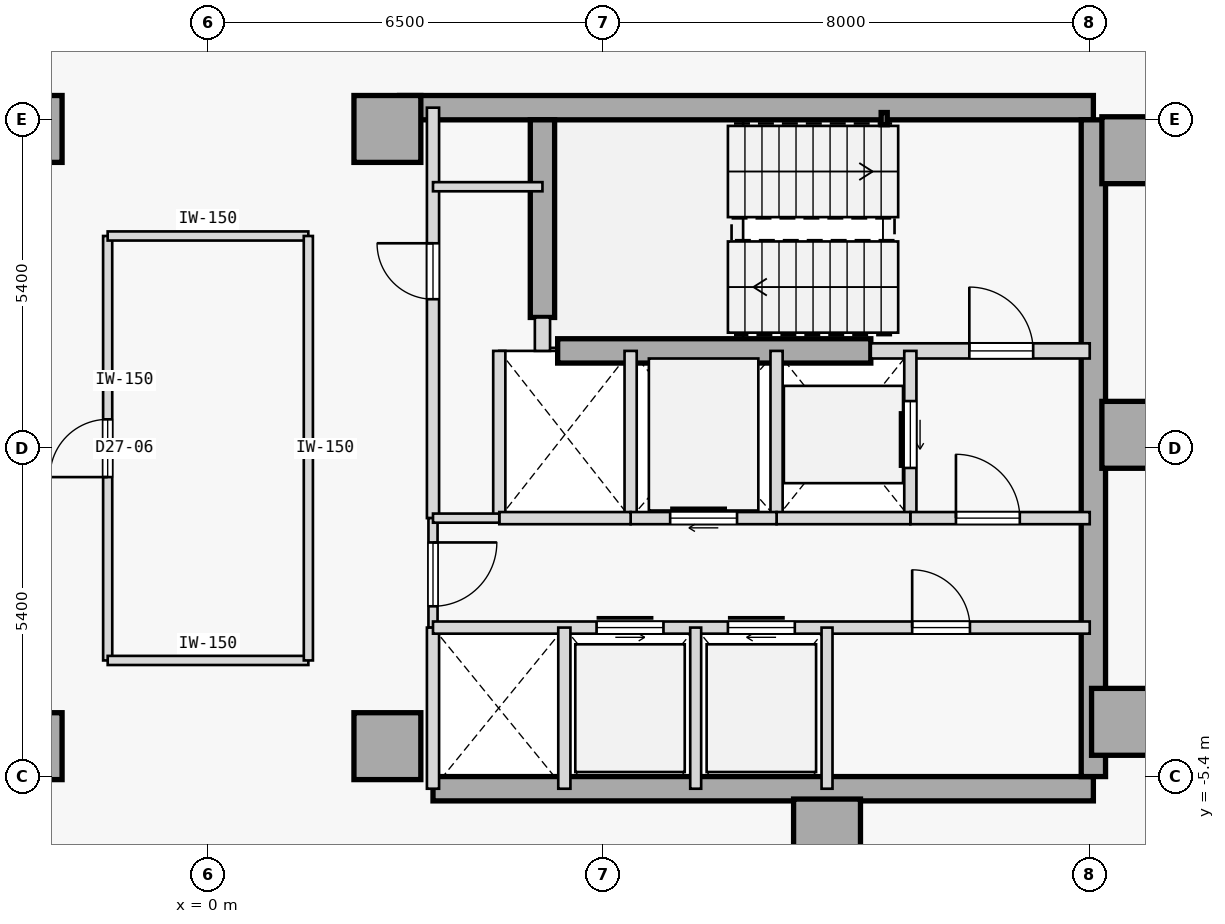
"""IFC4 building model, lengths in metres.
Left out: names, types, materials, properties, quantities, classifications, styles, units other than length and angle.
Written with IfcOpenShell. Run it as: python <this file> out.ifc"""

import sys

from ifc_helpers import new_model, si_unit, direction, frame, frame_2d, origin, origin_2d, place, context, subcontext, project, spatial, rectangle, hollow_rectangle, extrude, element, fill, save


model = new_model("IFC4")
c1 = context("Model", 3, precision=1e-05, world=origin(), true_north=direction((0.0, 1.0)))
c2 = subcontext(c1, "Body", "Model", "MODEL_VIEW")
j1 = project(units=[si_unit("LENGTHUNIT", "METRE"), si_unit("PLANEANGLEUNIT", "RADIAN")], contexts=[c1])
p1 = place(None, origin())
s1 = spatial("IfcSite", under=j1, at=p1, CompositionType="ELEMENT")
p2 = place(p1, origin())
s2 = spatial("IfcBuilding", under=s1, at=p2, CompositionType="ELEMENT")
p3 = place(p2, frame((0.0, 0.0, 109.6)))
s3 = spatial("IfcBuildingStorey", under=s2, at=p3, CompositionType="ELEMENT", Elevation=109.6)
for number, where, z_axis, x_axis in (
    (1, (-2.95, -4.9, 0.0), (0.0, 0.0, 1.0), (1.0, 0.0, 0.0)),
    (2, (-2.95, 5.25, 0.0), (0.0, 0.0, 1.0), (1.0, 0.0, 0.0)),
    (3, (15.25, 4.9, 0.0), (0.0, 0.0, 1.0), (1.0, 0.0, 0.0)),
    (4, (15.25, 0.22, 0.0), (0.0, 0.0, 1.0), (1.0, 0.0, 0.0)),
    (5, (15.08, -4.5, 0.0), (0.0, 0.0, 1.0), (1.0, 0.0, 0.0)),
    (6, (10.18, -6.32, 0.0), (0.0, 0.0, 1.0), (1.0, 0.0, 0.0)),
    (7, (2.95, -4.9, 0.0), (0.0, 0.0, 1.0), (1.0, 0.0, 0.0)),
    (8, (2.95, 5.25, 0.0), (0.0, 0.0, 1.0), (1.0, 0.0, 0.0)),
):
    element("IfcColumn", number, at=place(p3, frame(where, z_axis=z_axis, x_axis=x_axis)), inside=s3, PredefinedType="COLUMN", context=c2, shape_type="SweptSolid", body=[
        extrude(rectangle(XDim=1.1, YDim=1.1, at=origin_2d()), origin(), (0.0, 0.0, 1.0), 3.7),
    ])
p4 = place(p3, frame((3.15, 5.6, 0.0), z_axis=(0.0, 0.0, 1.0), x_axis=(1.0, 0.0, 0.0)))
e9 = element("IfcWall", 9, at=p4, inside=s3, PredefinedType="SHEAR", context=c2, shape_type="SweptSolid", body=[
    extrude(rectangle(XDim=11.41, YDim=0.4, at=frame_2d((5.705, 0.0))), origin(), (0.0, 0.0, 1.0), 3.475),
])
p5 = place(p3, frame((3.7, -5.6, 0.0), z_axis=(0.0, 0.0, 1.0), x_axis=(1.0, 0.0, 0.0)))
e10 = element("IfcWall", 10, at=p5, inside=s3, PredefinedType="SHEAR", context=c2, shape_type="SweptSolid", body=[
    extrude(rectangle(XDim=10.86, YDim=0.4, at=frame_2d((5.43, 0.0))), origin(), (0.0, 0.0, 1.0), 3.475),
])
p6 = place(p3, frame((14.56, -5.4, 0.0), z_axis=(0.0, 0.0, 1.0), x_axis=(0.0, 1.0, 0.0)))
e11 = element("IfcWall", 11, at=p6, inside=s3, PredefinedType="SHEAR", context=c2, shape_type="SweptSolid", body=[
    extrude(rectangle(XDim=10.8, YDim=0.4, at=frame_2d((5.4, 0.0))), origin(), (0.0, 0.0, 1.0), 3.475),
])
p7 = place(p3, frame((5.5, 2.15, 0.0), z_axis=(0.0, 0.0, 1.0), x_axis=(0.0, 1.0, 0.0)))
e12 = element("IfcWall", 12, at=p7, inside=s3, PredefinedType="SHEAR", context=c2, shape_type="SweptSolid", body=[
    extrude(rectangle(XDim=3.25, YDim=0.4, at=frame_2d((1.625, 0.0))), origin(), (0.0, 0.0, 1.0), 3.475),
])
p8 = place(p3, frame((5.75, 1.6, 0.0), z_axis=(0.0, 0.0, 1.0), x_axis=(1.0, 0.0, 0.0)))
e13 = element("IfcWall", 13, at=p8, inside=s3, PredefinedType="SHEAR", context=c2, shape_type="SweptSolid", body=[
    extrude(rectangle(XDim=5.15, YDim=0.4, at=frame_2d((2.575, 0.0))), origin(), (0.0, 0.0, 1.0), 3.475),
])
p9 = place(p3, frame((11.12, 5.42, 0.0), z_axis=(0.0, 0.0, 1.0), x_axis=(1.0, 0.0, 0.0)))
e14 = element("IfcColumn", 14, at=p9, inside=s3, PredefinedType="COLUMN", context=c2, shape_type="SweptSolid", body=[
    extrude(hollow_rectangle(XDim=0.1, YDim=0.2, WallThickness=0.008, at=origin_2d()), origin(), (0.0, 0.0, 1.0), 3.7),
])
p10 = place(p3, frame((10.9, 1.6, 0.0), z_axis=(0.0, 0.0, 1.0), x_axis=(1.0, 0.0, 0.0)))
e15 = element("IfcWall", 15, at=p10, inside=s3, PredefinedType="STANDARD", context=c2, shape_type="SweptSolid", body=[
    extrude(rectangle(XDim=3.6, YDim=0.25, at=frame_2d((1.8, 0.0))), origin(), (0.0, 0.0, 1.0), 3.475),
])
p11 = place(p10, frame((1.62, 0.0, 0.0)))
e16 = element("IfcOpeningElement", 16, at=p11, cuts=e15, PredefinedType="OPENING", context=c2, shape_type="SweptSolid", body=[
    extrude(rectangle(XDim=1.05, YDim=2.15, at=frame_2d((0.525, 1.075))), frame((0.0, 0.135, 0.0), z_axis=(0.0, -1.0, 0.0), x_axis=(1.0, 0.0, 0.0)), (0.0, 0.0, 1.0), 0.27),
])
p12 = place(p3, frame((5.5, 1.6, 0.0), z_axis=(0.0, 0.0, 1.0), x_axis=(0.0, 1.0, 0.0)))
e17 = element("IfcWall", 17, at=p12, inside=s3, PredefinedType="STANDARD", context=c2, shape_type="SweptSolid", body=[
    extrude(rectangle(XDim=0.55, YDim=0.25, at=frame_2d((0.275, 0.0))), origin(), (0.0, 0.0, 1.0), 3.475),
])
p13 = place(p3, frame((3.7, -1.15, 0.0), z_axis=(0.0, 0.0, 1.0), x_axis=(0.0, 1.0, 0.0)))
e18 = element("IfcWall", 18, at=p13, inside=s3, PredefinedType="STANDARD", context=c2, shape_type="SweptSolid", body=[
    extrude(rectangle(XDim=6.75, YDim=0.2, at=frame_2d((3.375, 0.0))), origin(), (0.0, 0.0, 1.0), 3.475),
])
p14 = place(p13, frame((3.6, 0.0, 0.0)))
e19 = element("IfcOpeningElement", 19, at=p14, cuts=e18, PredefinedType="OPENING", context=c2, shape_type="SweptSolid", body=[
    extrude(rectangle(XDim=0.92, YDim=2.15, at=frame_2d((0.46, 1.075))), frame((0.0, 0.11, 0.0), z_axis=(0.0, -1.0, 0.0), x_axis=(1.0, 0.0, 0.0)), (0.0, 0.0, 1.0), 0.22),
])
p15 = place(p3, frame((3.7, -2.95, 0.0), z_axis=(0.0, 0.0, 1.0), x_axis=(0.0, 1.0, 0.0)))
e20 = element("IfcWall", 20, at=p15, inside=s3, PredefinedType="PARTITIONING", context=c2, shape_type="SweptSolid", body=[
    extrude(rectangle(XDim=1.8, YDim=0.15, at=frame_2d((0.9, 0.0))), origin(), (0.0, 0.0, 1.0), 3.475),
])
p16 = place(p15, frame((0.35, 0.0, 0.0)))
e21 = element("IfcOpeningElement", 21, at=p16, cuts=e20, PredefinedType="OPENING", context=c2, shape_type="SweptSolid", body=[
    extrude(rectangle(XDim=1.05, YDim=2.18, at=frame_2d((0.525, 1.09))), frame((0.0, 0.085, 0.0), z_axis=(0.0, -1.0, 0.0), x_axis=(1.0, 0.0, 0.0)), (0.0, 0.0, 1.0), 0.17),
])
p17 = place(p3, frame((3.7, -5.6, 0.0), z_axis=(0.0, 0.0, 1.0), x_axis=(0.0, 1.0, 0.0)))
e22 = element("IfcWall", 22, at=p17, inside=s3, PredefinedType="STANDARD", context=c2, shape_type="SweptSolid", body=[
    extrude(rectangle(XDim=2.65, YDim=0.2, at=frame_2d((1.325, 0.0))), origin(), (0.0, 0.0, 1.0), 3.475),
])
p18 = place(p3, frame((11.55, -1.15, 0.0), z_axis=(0.0, 0.0, 1.0), x_axis=(0.0, 1.0, 0.0)))
e23 = element("IfcWall", 23, at=p18, inside=s3, PredefinedType="STANDARD", context=c2, shape_type="SweptSolid", body=[
    extrude(rectangle(XDim=2.75, YDim=0.2, at=frame_2d((1.375, 0.0))), origin(), (0.0, 0.0, 1.0), 3.475),
])
p19 = place(p18, frame((0.825, 0.0, 0.0)))
e24 = element("IfcOpeningElement", 24, at=p19, cuts=e23, PredefinedType="OPENING", context=c2, shape_type="SweptSolid", body=[
    extrude(rectangle(XDim=1.1, YDim=2.15, at=frame_2d((0.55, 1.075))), frame((0.0, 0.11, 0.0), z_axis=(0.0, -1.0, 0.0), x_axis=(1.0, 0.0, 0.0)), (0.0, 0.0, 1.0), 0.22),
])
p20 = place(p3, frame((9.35, -1.15, 0.0), z_axis=(0.0, 0.0, 1.0), x_axis=(0.0, 1.0, 0.0)))
e25 = element("IfcWall", 25, at=p20, inside=s3, PredefinedType="STANDARD", context=c2, shape_type="SweptSolid", body=[
    extrude(rectangle(XDim=2.75, YDim=0.2, at=frame_2d((1.375, 0.0))), origin(), (0.0, 0.0, 1.0), 3.475),
])
p21 = place(p3, frame((11.55, -1.15, 0.0), z_axis=(0.0, 0.0, 1.0), x_axis=(1.0, 0.0, 0.0)))
e26 = element("IfcWall", 26, at=p21, inside=s3, PredefinedType="STANDARD", context=c2, shape_type="SweptSolid", body=[
    extrude(rectangle(XDim=2.95, YDim=0.2, at=frame_2d((1.475, 0.0))), origin(), (0.0, 0.0, 1.0), 3.475),
])
p22 = place(p21, frame((0.75, 0.0, 0.0)))
e27 = element("IfcOpeningElement", 27, at=p22, cuts=e26, PredefinedType="OPENING", context=c2, shape_type="SweptSolid", body=[
    extrude(rectangle(XDim=1.05, YDim=2.18, at=frame_2d((0.525, 1.09))), frame((0.0, 0.11, 0.0), z_axis=(0.0, -1.0, 0.0), x_axis=(1.0, 0.0, 0.0)), (0.0, 0.0, 1.0), 0.22),
])
p23 = place(p3, frame((9.35, -1.15, 0.0), z_axis=(0.0, 0.0, 1.0), x_axis=(1.0, 0.0, 0.0)))
e28 = element("IfcWall", 28, at=p23, inside=s3, PredefinedType="STANDARD", context=c2, shape_type="SweptSolid", body=[
    extrude(rectangle(XDim=2.2, YDim=0.2, at=frame_2d((1.1, 0.0))), origin(), (0.0, 0.0, 1.0), 3.475),
])
p24 = place(p3, frame((6.95, -1.15, 0.0), z_axis=(0.0, 0.0, 1.0), x_axis=(0.0, 1.0, 0.0)))
e29 = element("IfcWall", 29, at=p24, inside=s3, PredefinedType="STANDARD", context=c2, shape_type="SweptSolid", body=[
    extrude(rectangle(XDim=2.75, YDim=0.2, at=frame_2d((1.375, 0.0))), origin(), (0.0, 0.0, 1.0), 3.475),
])
p25 = place(p3, frame((6.95, -1.15, 0.0), z_axis=(0.0, 0.0, 1.0), x_axis=(1.0, 0.0, 0.0)))
e30 = element("IfcWall", 30, at=p25, inside=s3, PredefinedType="STANDARD", context=c2, shape_type="SweptSolid", body=[
    extrude(rectangle(XDim=2.4, YDim=0.2, at=frame_2d((1.2, 0.0))), origin(), (0.0, 0.0, 1.0), 3.475),
])
p26 = place(p25, frame((0.65, 0.0, 0.0)))
e31 = element("IfcOpeningElement", 31, at=p26, cuts=e30, PredefinedType="OPENING", context=c2, shape_type="SweptSolid", body=[
    extrude(rectangle(XDim=1.1, YDim=2.15, at=frame_2d((0.55, 1.075))), frame((0.0, 0.11, 0.0), z_axis=(0.0, -1.0, 0.0), x_axis=(1.0, 0.0, 0.0)), (0.0, 0.0, 1.0), 0.22),
])
p27 = place(p3, frame((4.79, -1.15, 0.0), z_axis=(0.0, 0.0, 1.0), x_axis=(0.0, 1.0, 0.0)))
e32 = element("IfcWall", 32, at=p27, inside=s3, PredefinedType="STANDARD", context=c2, shape_type="SweptSolid", body=[
    extrude(rectangle(XDim=2.75, YDim=0.2, at=frame_2d((1.375, 0.0))), origin(), (0.0, 0.0, 1.0), 3.475),
])
p28 = place(p3, frame((4.79, -1.15, 0.0), z_axis=(0.0, 0.0, 1.0), x_axis=(1.0, 0.0, 0.0)))
e33 = element("IfcWall", 33, at=p28, inside=s3, PredefinedType="STANDARD", context=c2, shape_type="SweptSolid", body=[
    extrude(rectangle(XDim=2.16, YDim=0.2, at=frame_2d((1.08, 0.0))), origin(), (0.0, 0.0, 1.0), 3.475),
])
p29 = place(p3, frame((3.7, -1.15, 0.0), z_axis=(0.0, 0.0, 1.0), x_axis=(1.0, 0.0, 0.0)))
e34 = element("IfcWall", 34, at=p29, inside=s3, PredefinedType="PARTITIONING", context=c2, shape_type="SweptSolid", body=[
    extrude(rectangle(XDim=1.09, YDim=0.15, at=frame_2d((0.545, 0.0))), origin(), (0.0, 0.0, 1.0), 3.475),
])
p30 = place(p3, frame((3.7, -2.95, 0.0), z_axis=(0.0, 0.0, 1.0), x_axis=(1.0, 0.0, 0.0)))
e35 = element("IfcWall", 35, at=p30, inside=s3, PredefinedType="STANDARD", context=c2, shape_type="SweptSolid", body=[
    extrude(rectangle(XDim=10.8, YDim=0.2, at=frame_2d((5.4, 0.0))), origin(), (0.0, 0.0, 1.0), 3.475),
])
p31 = place(p30, frame((2.69, 0.0, 0.0)))
e36 = element("IfcOpeningElement", 36, at=p31, cuts=e35, PredefinedType="OPENING", context=c2, shape_type="SweptSolid", body=[
    extrude(rectangle(XDim=1.1, YDim=2.15, at=frame_2d((0.55, 1.075))), frame((0.0, 0.11, 0.0), z_axis=(0.0, -1.0, 0.0), x_axis=(1.0, 0.0, 0.0)), (0.0, 0.0, 1.0), 0.22),
])
p32 = place(p30, frame((4.85, 0.0, 0.0)))
e37 = element("IfcOpeningElement", 37, at=p32, cuts=e35, PredefinedType="OPENING", context=c2, shape_type="SweptSolid", body=[
    extrude(rectangle(XDim=1.1, YDim=2.15, at=frame_2d((0.55, 1.075))), frame((0.0, 0.11, 0.0), z_axis=(0.0, -1.0, 0.0), x_axis=(1.0, 0.0, 0.0)), (0.0, 0.0, 1.0), 0.22),
])
p33 = place(p30, frame((7.88, 0.0, 0.0)))
e38 = element("IfcOpeningElement", 38, at=p33, cuts=e35, PredefinedType="OPENING", context=c2, shape_type="SweptSolid", body=[
    extrude(rectangle(XDim=0.95, YDim=2.15, at=frame_2d((0.475, 1.075))), frame((0.0, 0.11, 0.0), z_axis=(0.0, -1.0, 0.0), x_axis=(1.0, 0.0, 0.0)), (0.0, 0.0, 1.0), 0.22),
])
p34 = place(p3, frame((5.86, -5.6, 0.0), z_axis=(0.0, 0.0, 1.0), x_axis=(0.0, 1.0, 0.0)))
e39 = element("IfcWall", 39, at=p34, inside=s3, PredefinedType="STANDARD", context=c2, shape_type="SweptSolid", body=[
    extrude(rectangle(XDim=2.65, YDim=0.2, at=frame_2d((1.325, 0.0))), origin(), (0.0, 0.0, 1.0), 3.475),
])
for number, where, z_axis, x_axis in (
    (40, (10.18, -5.6, 0.0), (0.0, 0.0, 1.0), (0.0, 1.0, 0.0)),
    (41, (8.02, -5.6, 0.0), (0.0, 0.0, 1.0), (0.0, 1.0, 0.0)),
):
    element("IfcWall", number, at=place(p3, frame(where, z_axis=z_axis, x_axis=x_axis)), inside=s3, PredefinedType="STANDARD", context=c2, shape_type="SweptSolid", body=[
        extrude(rectangle(XDim=2.65, YDim=0.18, at=frame_2d((1.325, 0.0))), origin(), (0.0, 0.0, 1.0), 3.475),
    ])
p35 = place(p3, frame((3.7, 4.3, 0.0), z_axis=(0.0, 0.0, 1.0), x_axis=(1.0, 0.0, 0.0)))
e42 = element("IfcWall", 42, at=p35, inside=s3, PredefinedType="PARTITIONING", context=c2, shape_type="SweptSolid", body=[
    extrude(rectangle(XDim=1.8, YDim=0.15, at=frame_2d((0.9, 0.0))), origin(), (0.0, 0.0, 1.0), 3.475),
])
p36 = place(p3, frame((-1.65, -3.49, 0.0), z_axis=(0.0, 0.0, 1.0), x_axis=(-0.000104928124, 0.999999994495, 0.0)))
e43 = element("IfcWall", 43, at=p36, inside=s3, PredefinedType="PARTITIONING", context=c2, shape_type="SweptSolid", body=[
    extrude(rectangle(XDim=6.98, YDim=0.15, at=frame_2d((3.49, 0.0))), origin(), (0.0, 0.0, 1.0), 3.475),
])
p37 = place(p36, frame((3.015, 0.0, 0.0)))
e44 = element("IfcOpeningElement", 44, at=p37, cuts=e43, PredefinedType="OPENING", context=c2, shape_type="SweptSolid", body=[
    extrude(rectangle(XDim=0.95, YDim=2.15, at=frame_2d((0.475, 1.075))), frame((0.0, 0.085, 0.0), z_axis=(0.0, -1.0, 0.0), x_axis=(1.0, 0.0, 0.0)), (0.0, 0.0, 1.0), 0.17),
])
p38 = place(p3, frame((-1.65, -3.49, 0.0), z_axis=(0.0, 0.0, 1.0), x_axis=(1.0, 0.0, 0.0)))
e45 = element("IfcWall", 45, at=p38, inside=s3, PredefinedType="PARTITIONING", context=c2, shape_type="SweptSolid", body=[
    extrude(rectangle(XDim=3.3, YDim=0.15, at=frame_2d((1.65, 0.0))), origin(), (0.0, 0.0, 1.0), 3.475),
])
p39 = place(p3, frame((-1.65, 3.49, 0.0), z_axis=(0.0, 0.0, 1.0), x_axis=(1.0, 0.0, 0.0)))
e46 = element("IfcWall", 46, at=p39, inside=s3, PredefinedType="PARTITIONING", context=c2, shape_type="SweptSolid", body=[
    extrude(rectangle(XDim=3.3, YDim=0.15, at=frame_2d((1.65, 0.0))), origin(), (0.0, 0.0, 1.0), 3.475),
])
p40 = place(p3, frame((1.65, -3.49, 0.0), z_axis=(0.0, 0.0, 1.0), x_axis=(-6.9952083e-05, 0.999999997553, 0.0)))
e47 = element("IfcWall", 47, at=p40, inside=s3, PredefinedType="PARTITIONING", context=c2, shape_type="SweptSolid", body=[
    extrude(rectangle(XDim=6.98, YDim=0.15, at=frame_2d((3.49, 0.0))), origin(), (0.0, 0.0, 1.0), 3.475),
])
p41 = place(p11, origin())
e48 = element("IfcDoor", 48, at=p41, inside=s3, OperationType="SINGLE_SWING_LEFT", PredefinedType="DOOR", context=c2, shape_type="SweptSolid", body=[
    extrude(rectangle(XDim=1.05, YDim=2.15, at=frame_2d((0.525, 1.075))), frame((0.0, 0.025, 0.0), z_axis=(0.0, -1.0, 0.0), x_axis=(1.0, 0.0, 0.0)), (0.0, 0.0, 1.0), 0.05),
])
fill(e16, e48)
p42 = place(p22, origin())
e49 = element("IfcDoor", 49, at=p42, inside=s3, OperationType="SINGLE_SWING_LEFT", PredefinedType="DOOR", context=c2, shape_type="SweptSolid", body=[
    extrude(rectangle(XDim=1.05, YDim=2.18, at=frame_2d((0.525, 1.09))), frame((0.0, 0.025, 0.0), z_axis=(0.0, -1.0, 0.0), x_axis=(1.0, 0.0, 0.0)), (0.0, 0.0, 1.0), 0.05),
])
fill(e27, e49)
p43 = place(p16, frame((1.05, 0.0, 0.0), z_axis=(0.0, 0.0, 1.0), x_axis=(-1.0, 0.0, 0.0)))
e50 = element("IfcDoor", 50, at=p43, inside=s3, OperationType="SINGLE_SWING_RIGHT", PredefinedType="DOOR", context=c2, shape_type="SweptSolid", body=[
    extrude(rectangle(XDim=1.05, YDim=2.18, at=frame_2d((0.525, 1.09))), frame((0.0, 0.025, 0.0), z_axis=(0.0, -1.0, 0.0), x_axis=(1.0, 0.0, 0.0)), (0.0, 0.0, 1.0), 0.05),
])
fill(e21, e50)
p44 = place(p19, origin())
e51 = element("IfcDoor", 51, at=p44, inside=s3, OperationType="SLIDING_TO_RIGHT", PredefinedType="DOOR", context=c2, shape_type="SweptSolid", body=[
    extrude(rectangle(XDim=1.1, YDim=2.15, at=frame_2d((0.55, 1.075))), frame((0.0, 0.025, 0.0), z_axis=(0.0, -1.0, 0.0), x_axis=(1.0, 0.0, 0.0)), (0.0, 0.0, 1.0), 0.05),
])
fill(e24, e51)
p45 = place(p26, origin())
e52 = element("IfcDoor", 52, at=p45, inside=s3, OperationType="SLIDING_TO_RIGHT", PredefinedType="DOOR", context=c2, shape_type="SweptSolid", body=[
    extrude(rectangle(XDim=1.1, YDim=2.15, at=frame_2d((0.55, 1.075))), frame((0.0, 0.025, 0.0), z_axis=(0.0, -1.0, 0.0), x_axis=(1.0, 0.0, 0.0)), (0.0, 0.0, 1.0), 0.05),
])
fill(e31, e52)
p46 = place(p31, origin())
e53 = element("IfcDoor", 53, at=p46, inside=s3, OperationType="SLIDING_TO_LEFT", PredefinedType="DOOR", context=c2, shape_type="SweptSolid", body=[
    extrude(rectangle(XDim=1.1, YDim=2.15, at=frame_2d((0.55, 1.075))), frame((0.0, 0.025, 0.0), z_axis=(0.0, -1.0, 0.0), x_axis=(1.0, 0.0, 0.0)), (0.0, 0.0, 1.0), 0.05),
])
fill(e36, e53)
p47 = place(p32, origin())
e54 = element("IfcDoor", 54, at=p47, inside=s3, OperationType="SLIDING_TO_RIGHT", PredefinedType="DOOR", context=c2, shape_type="SweptSolid", body=[
    extrude(rectangle(XDim=1.1, YDim=2.15, at=frame_2d((0.55, 1.075))), frame((0.0, 0.025, 0.0), z_axis=(0.0, -1.0, 0.0), x_axis=(1.0, 0.0, 0.0)), (0.0, 0.0, 1.0), 0.05),
])
fill(e37, e54)
p48 = place(p33, origin())
e55 = element("IfcDoor", 55, at=p48, inside=s3, OperationType="SINGLE_SWING_LEFT", PredefinedType="DOOR", context=c2, shape_type="SweptSolid", body=[
    extrude(rectangle(XDim=0.95, YDim=2.15, at=frame_2d((0.475, 1.075))), frame((0.0, 0.025, 0.0), z_axis=(0.0, -1.0, 0.0), x_axis=(1.0, 0.0, 0.0)), (0.0, 0.0, 1.0), 0.05),
])
fill(e38, e55)
p49 = place(p14, origin())
e56 = element("IfcDoor", 56, at=p49, inside=s3, OperationType="SINGLE_SWING_RIGHT", PredefinedType="DOOR", context=c2, shape_type="SweptSolid", body=[
    extrude(rectangle(XDim=0.92, YDim=2.15, at=frame_2d((0.46, 1.075))), frame((0.0, 0.025, 0.0), z_axis=(0.0, -1.0, 0.0), x_axis=(1.0, 0.0, 0.0)), (0.0, 0.0, 1.0), 0.05),
])
fill(e19, e56)
p50 = place(p37, origin())
e57 = element("IfcDoor", 57, at=p50, inside=s3, OperationType="SINGLE_SWING_LEFT", PredefinedType="DOOR", context=c2, shape_type="SweptSolid", body=[
    extrude(rectangle(XDim=0.95, YDim=2.15, at=frame_2d((0.475, 1.075))), frame((0.0, 0.025, 0.0), z_axis=(0.0, -1.0, 0.0), x_axis=(1.0, 0.0, 0.0)), (0.0, 0.0, 1.0), 0.05),
])
fill(e44, e57)
save(model, sys.argv[1])
